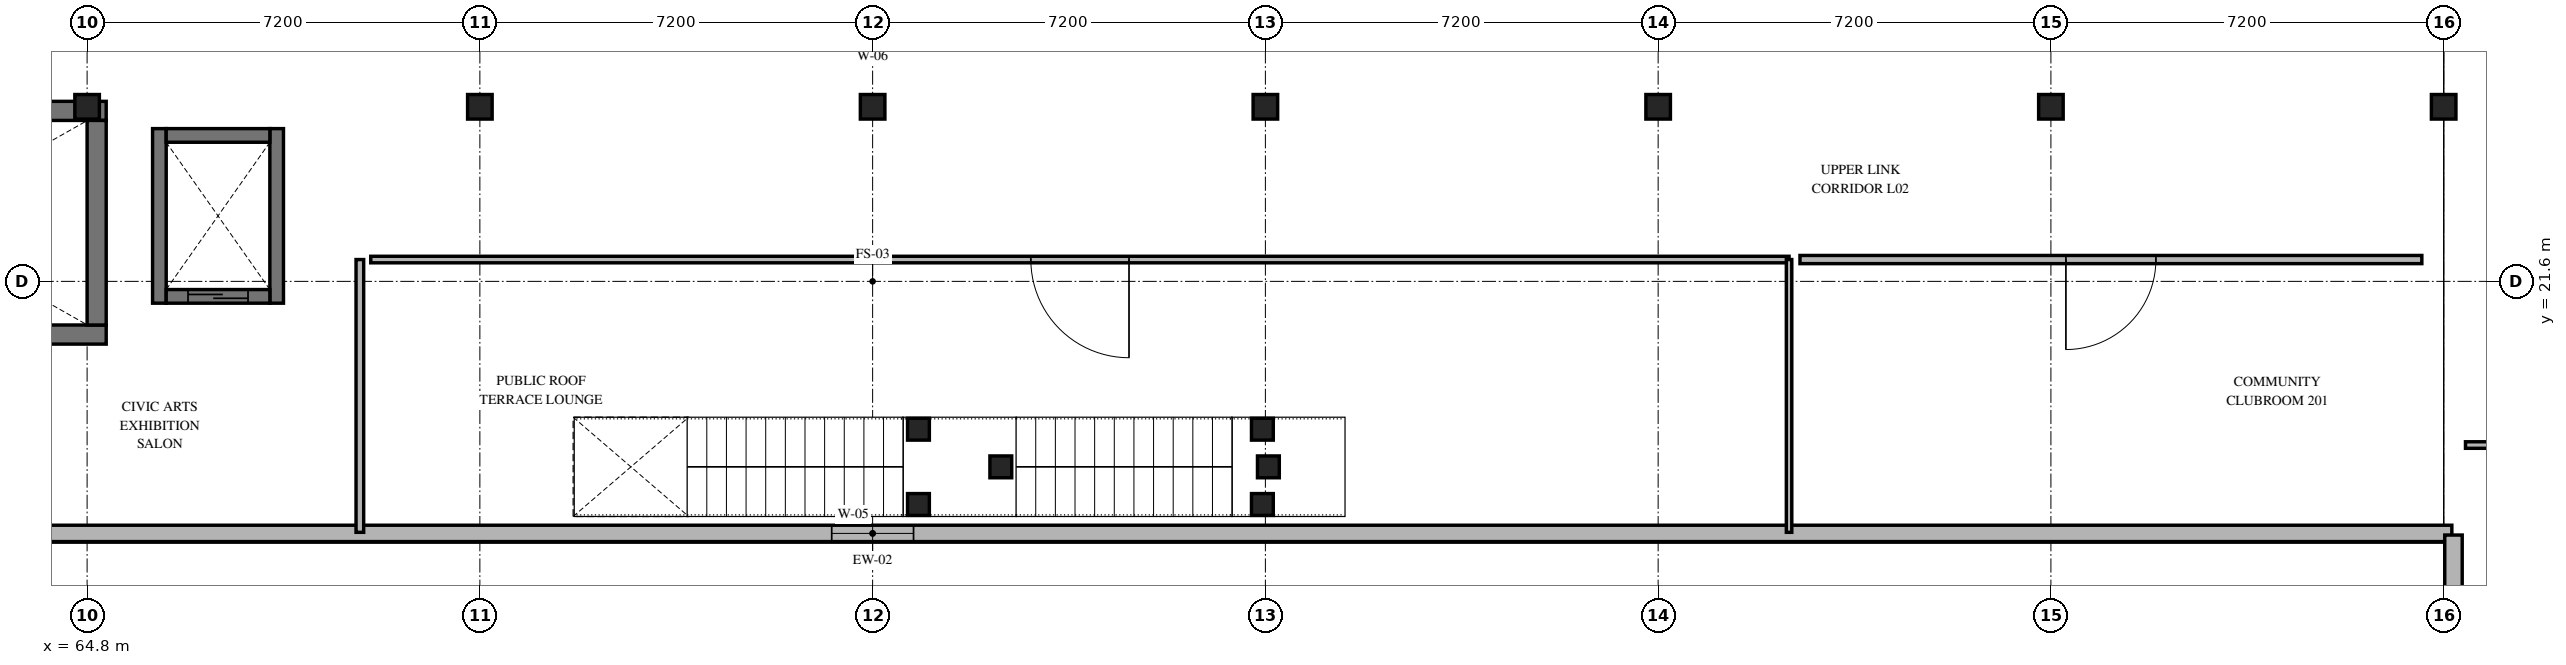
"""IFC4 building model, lengths in metres.
Left out: names, types, materials, properties, quantities, classifications, styles, units other than length and angle.
Written with IfcOpenShell. Run it as: python <this file> out.ifc"""

import sys

from ifc_helpers import new_model, si_unit, direction, frame, frame_2d, origin, origin_2d, place, context, subcontext, project, spatial, rectangle, extrude, element, fill, save


model = new_model("IFC4")
c1 = context("Model", 3, precision=1e-05, world=origin(), true_north=direction((0.0, 1.0)))
c2 = subcontext(c1, "Body", "Model", "MODEL_VIEW")
j1 = project(units=[si_unit("LENGTHUNIT", "METRE"), si_unit("PLANEANGLEUNIT", "RADIAN")], contexts=[c1])
p1 = place(None, origin())
s1 = spatial("IfcSite", under=j1, at=p1, CompositionType="ELEMENT")
p2 = place(p1, origin())
s2 = spatial("IfcBuilding", under=s1, at=p2, CompositionType="ELEMENT")
p3 = place(p2, frame((0.0, 0.0, 8.7)))
s3 = spatial("IfcBuildingStorey", under=s2, at=p3, CompositionType="ELEMENT", Elevation=8.7)
for number, where, z_axis, x_axis in (
    (1, (64.8, 24.8, 0.0), (0.0, 0.0, 1.0), (1.0, 0.0, 0.0)),
    (2, (72.0, 24.8, 0.0), (0.0, 0.0, 1.0), (1.0, 0.0, 0.0)),
    (3, (79.2, 24.8, 0.0), (0.0, 0.0, 1.0), (1.0, 0.0, 0.0)),
    (4, (86.4, 24.8, 0.0), (0.0, 0.0, 1.0), (1.0, 0.0, 0.0)),
    (5, (93.6, 24.8, 0.0), (0.0, 0.0, 1.0), (1.0, 0.0, 0.0)),
    (6, (100.8, 24.8, 0.0), (0.0, 0.0, 1.0), (1.0, 0.0, 0.0)),
    (7, (108.0, 24.8, 0.0), (0.0, 0.0, 1.0), (1.0, 0.0, 0.0)),
):
    element("IfcColumn", number, at=place(p3, frame(where, z_axis=z_axis, x_axis=x_axis)), inside=s3, PredefinedType="COLUMN", context=c2, shape_type="SweptSolid", body=[
        extrude(rectangle(XDim=0.45, YDim=0.45, at=origin_2d()), origin(), (0.0, 0.0, 1.0), 4.2),
    ])
p4 = place(p3, frame((108.15, 16.98, 0.0), z_axis=(0.0, 0.0, 1.0), x_axis=(-1.0, 0.0, 0.0)))
e8 = element("IfcWall", 8, at=p4, inside=s3, PredefinedType="SOLIDWALL", context=c2, shape_type="SweptSolid", body=[
    extrude(rectangle(XDim=57.9, YDim=0.3, at=frame_2d((28.95, 0.0))), origin(), (0.0, 0.0, 1.0), 3.16),
])
p5 = place(p4, frame((28.2, 0.0, 0.9)))
e9 = element("IfcOpeningElement", 9, at=p5, cuts=e8, PredefinedType="OPENING", context=c2, shape_type="SweptSolid", body=[
    extrude(rectangle(XDim=1.5, YDim=1.2, at=frame_2d((0.75, 0.6))), frame((0.0, 0.16, 0.0), z_axis=(0.0, -1.0, 0.0), x_axis=(1.0, 0.0, 0.0)), (0.0, 0.0, 1.0), 0.32),
])
p6 = place(p3, frame((108.18, 14.61, 0.0), z_axis=(0.0, 0.0, 1.0), x_axis=(0.0, 1.0, 0.0)))
e10 = element("IfcWall", 10, at=p6, inside=s3, PredefinedType="SOLIDWALL", context=c2, shape_type="SweptSolid", body=[
    extrude(rectangle(XDim=2.34, YDim=0.32, at=frame_2d((1.17, 0.0))), origin(), (0.0, 0.0, 1.0), 3.31),
])
for number, where, z_axis, x_axis in (
    (11, (56.05, 20.625, 0.0), (0.0, 0.0, 1.0), (1.0, 0.0, 0.0)),
    (12, (65.15, 24.725, 0.0), (0.0, 0.0, 1.0), (-1.0, 0.0, 0.0)),
):
    element("IfcWall", number, at=place(p3, frame(where, z_axis=z_axis, x_axis=x_axis)), inside=s3, PredefinedType="SHEAR", context=c2, shape_type="SweptSolid", body=[
        extrude(rectangle(XDim=9.1, YDim=0.35, at=frame_2d((4.55, 0.0))), origin(), (0.0, 0.0, 1.0), 3.96),
    ])
p7 = place(p3, frame((64.975, 20.8, 0.0), z_axis=(0.0, 0.0, 1.0), x_axis=(0.0, 1.0, 0.0)))
e13 = element("IfcWall", 13, at=p7, inside=s3, PredefinedType="SHEAR", context=c2, shape_type="SweptSolid", body=[
    extrude(rectangle(XDim=3.75, YDim=0.35, at=frame_2d((1.875, 0.0))), origin(), (0.0, 0.0, 1.0), 3.96),
])
for number, where, z_axis, x_axis in (
    (14, (80.04, 17.51, 0.0), (0.0, 0.0, 1.0), (1.0, 0.0, 0.0)),
    (15, (80.04, 18.89, 0.0), (0.0, 0.0, 1.0), (1.0, 0.0, 0.0)),
    (16, (81.55, 18.2, 0.0), (0.0, 0.0, 1.0), (1.0, 0.0, 0.0)),
):
    element("IfcColumn", number, at=place(p3, frame(where, z_axis=z_axis, x_axis=x_axis)), inside=s3, PredefinedType="COLUMN", context=c2, shape_type="SweptSolid", body=[
        extrude(rectangle(XDim=0.4, YDim=0.4, at=origin_2d()), origin(), (0.0, 0.0, 1.0), 1.9),
    ])
for number, where, z_axis, x_axis in (
    (17, (86.345, 17.51, 0.0), (0.0, 0.0, 1.0), (1.0, 0.0, 0.0)),
    (18, (86.345, 18.89, 0.0), (0.0, 0.0, 1.0), (1.0, 0.0, 0.0)),
    (19, (86.455, 18.2, 0.0), (0.0, 0.0, 1.0), (1.0, 0.0, 0.0)),
):
    element("IfcColumn", number, at=place(p3, frame(where, z_axis=z_axis, x_axis=x_axis)), inside=s3, PredefinedType="COLUMN", context=c2, shape_type="SweptSolid", body=[
        extrude(rectangle(XDim=0.4, YDim=0.4, at=origin_2d()), origin(), (0.0, 0.0, 1.0), 4.0),
    ])
for number, where, z_axis, x_axis in (
    (20, (66.125, 21.2, 0.0), (0.0, 0.0, 1.0), (0.0, 1.0, 0.0)),
    (21, (68.275, 24.4, 0.0), (0.0, 0.0, 1.0), (0.0, -1.0, 0.0)),
):
    element("IfcWall", number, at=place(p3, frame(where, z_axis=z_axis, x_axis=x_axis)), inside=s3, PredefinedType="SOLIDWALL", context=c2, shape_type="SweptSolid", body=[
        extrude(rectangle(XDim=3.2, YDim=0.25, at=frame_2d((1.6, 0.0))), origin(), (0.0, 0.0, 1.0), 3.96),
    ])
p8 = place(p3, frame((66.25, 21.325, 0.0), z_axis=(0.0, 0.0, 1.0), x_axis=(1.0, 0.0, 0.0)))
e22 = element("IfcWall", 22, at=p8, inside=s3, PredefinedType="SOLIDWALL", context=c2, shape_type="SweptSolid", body=[
    extrude(rectangle(XDim=1.9, YDim=0.25, at=frame_2d((0.95, 0.0))), origin(), (0.0, 0.0, 1.0), 3.96),
])
p9 = place(p8, frame((0.4, 0.0, 0.0)))
e23 = element("IfcOpeningElement", 23, at=p9, cuts=e22, PredefinedType="OPENING", context=c2, shape_type="SweptSolid", body=[
    extrude(rectangle(XDim=1.1, YDim=2.2, at=frame_2d((0.55, 1.1))), frame((0.0, 0.135, 0.0), z_axis=(0.0, -1.0, 0.0), x_axis=(1.0, 0.0, 0.0)), (0.0, 0.0, 1.0), 0.27),
])
p10 = place(p3, frame((68.15, 24.275, 0.0), z_axis=(0.0, 0.0, 1.0), x_axis=(-1.0, 0.0, 0.0)))
e24 = element("IfcWall", 24, at=p10, inside=s3, PredefinedType="SOLIDWALL", context=c2, shape_type="SweptSolid", body=[
    extrude(rectangle(XDim=1.9, YDim=0.25, at=frame_2d((0.95, 0.0))), origin(), (0.0, 0.0, 1.0), 3.96),
])
p11 = place(p3, frame((69.8, 17.0, 0.0), z_axis=(0.0, 0.0, 1.0), x_axis=(0.0, 1.0, 0.0)))
e25 = element("IfcWall", 25, at=p11, inside=s3, PredefinedType="PARTITIONING", context=c2, shape_type="SweptSolid", body=[
    extrude(rectangle(XDim=5.0, YDim=0.14, at=frame_2d((2.5, 0.0))), origin(), (0.0, 0.0, 1.0), 3.96),
])
p12 = place(p3, frame((96.0, 22.0, 0.0), z_axis=(0.0, 0.0, 1.0), x_axis=(-1.0, 0.0, 0.0)))
e26 = element("IfcWall", 26, at=p12, inside=s3, PredefinedType="PARTITIONING", context=c2, shape_type="SweptSolid", body=[
    extrude(rectangle(XDim=26.0, YDim=0.12, at=frame_2d((13.0, 0.0))), origin(), (0.0, 0.0, 1.0), 3.16),
])
p13 = place(p12, frame((12.1, 0.0, 0.0)))
e27 = element("IfcOpeningElement", 27, at=p13, cuts=e26, PredefinedType="OPENING", context=c2, shape_type="SweptSolid", body=[
    extrude(rectangle(XDim=1.8, YDim=2.3, at=frame_2d((0.9, 1.15))), frame((0.0, 0.07, 0.0), z_axis=(0.0, -1.0, 0.0), x_axis=(1.0, 0.0, 0.0)), (0.0, 0.0, 1.0), 0.14),
])
p14 = place(p3, frame((96.0, 17.0, 0.0), z_axis=(0.0, 0.0, 1.0), x_axis=(0.0, 1.0, 0.0)))
e28 = element("IfcWall", 28, at=p14, inside=s3, PredefinedType="PARTITIONING", context=c2, shape_type="SweptSolid", body=[
    extrude(rectangle(XDim=5.0, YDim=0.1, at=frame_2d((2.5, 0.0))), origin(), (0.0, 0.0, 1.0), 3.2),
])
p15 = place(p3, frame((107.6, 22.0, 0.0), z_axis=(0.0, 0.0, 1.0), x_axis=(-1.0, 0.0, 0.0)))
e29 = element("IfcWall", 29, at=p15, inside=s3, PredefinedType="PARTITIONING", context=c2, shape_type="SweptSolid", body=[
    extrude(rectangle(XDim=11.4, YDim=0.15, at=frame_2d((5.7, 0.0))), origin(), (0.0, 0.0, 1.0), 3.26),
])
p16 = place(p15, frame((4.875, 0.0, 0.0)))
e30 = element("IfcOpeningElement", 30, at=p16, cuts=e29, PredefinedType="OPENING", context=c2, shape_type="SweptSolid", body=[
    extrude(rectangle(XDim=1.65, YDim=2.3, at=frame_2d((0.825, 1.15))), frame((0.0, 0.085, 0.0), z_axis=(0.0, -1.0, 0.0), x_axis=(1.0, 0.0, 0.0)), (0.0, 0.0, 1.0), 0.17),
])
p17 = place(p3, frame((108.4, 18.6, 0.0), z_axis=(0.0, 0.0, 1.0), x_axis=(1.0, 0.0, 0.0)))
e31 = element("IfcWall", 31, at=p17, inside=s3, PredefinedType="PARTITIONING", context=c2, shape_type="SweptSolid", body=[
    extrude(rectangle(XDim=7.45, YDim=0.12, at=frame_2d((3.725, 0.0))), origin(), (0.0, 0.0, 1.0), 3.16),
])
p18 = place(p17, frame((3.8, 0.0, 0.0)))
e32 = element("IfcOpeningElement", 32, at=p18, cuts=e31, PredefinedType="OPENING", context=c2, shape_type="SweptSolid", body=[
    extrude(rectangle(XDim=1.0, YDim=2.15, at=frame_2d((0.5, 1.075))), frame((0.0, 0.07, 0.0), z_axis=(0.0, -1.0, 0.0), x_axis=(1.0, 0.0, 0.0)), (0.0, 0.0, 1.0), 0.14),
])
p19 = place(p5, origin())
e33 = element("IfcWindow", 33, at=p19, inside=s3, PartitioningType="SINGLE_PANEL", PredefinedType="WINDOW", context=c2, shape_type="SweptSolid", body=[
    extrude(rectangle(XDim=1.5, YDim=1.2, at=frame_2d((0.75, 0.6))), frame((0.0, 0.03, 0.0), z_axis=(0.0, -1.0, 0.0), x_axis=(1.0, 0.0, 0.0)), (0.0, 0.0, 1.0), 0.06),
])
fill(e9, e33)
p20 = place(p9, origin())
e34 = element("IfcDoor", 34, at=p20, inside=s3, OperationType="DOUBLE_DOOR_SLIDING", PredefinedType="DOOR", context=c2, shape_type="SweptSolid", body=[
    extrude(rectangle(XDim=1.1, YDim=2.2, at=frame_2d((0.55, 1.1))), frame((0.0, 0.025, 0.0), z_axis=(0.0, -1.0, 0.0), x_axis=(1.0, 0.0, 0.0)), (0.0, 0.0, 1.0), 0.05),
])
fill(e23, e34)
p21 = place(p13, origin())
e35 = element("IfcDoor", 35, at=p21, inside=s3, OperationType="SINGLE_SWING_LEFT", PredefinedType="DOOR", context=c2, shape_type="SweptSolid", body=[
    extrude(rectangle(XDim=1.8, YDim=2.3, at=frame_2d((0.9, 1.15))), frame((0.0, 0.025, 0.0), z_axis=(0.0, -1.0, 0.0), x_axis=(1.0, 0.0, 0.0)), (0.0, 0.0, 1.0), 0.05),
])
fill(e27, e35)
p22 = place(p16, origin())
e36 = element("IfcDoor", 36, at=p22, inside=s3, OperationType="SINGLE_SWING_RIGHT", PredefinedType="DOOR", context=c2, shape_type="SweptSolid", body=[
    extrude(rectangle(XDim=1.65, YDim=2.3, at=frame_2d((0.825, 1.15))), frame((0.0, 0.025, 0.0), z_axis=(0.0, -1.0, 0.0), x_axis=(1.0, 0.0, 0.0)), (0.0, 0.0, 1.0), 0.05),
])
fill(e30, e36)
save(model, sys.argv[1])
